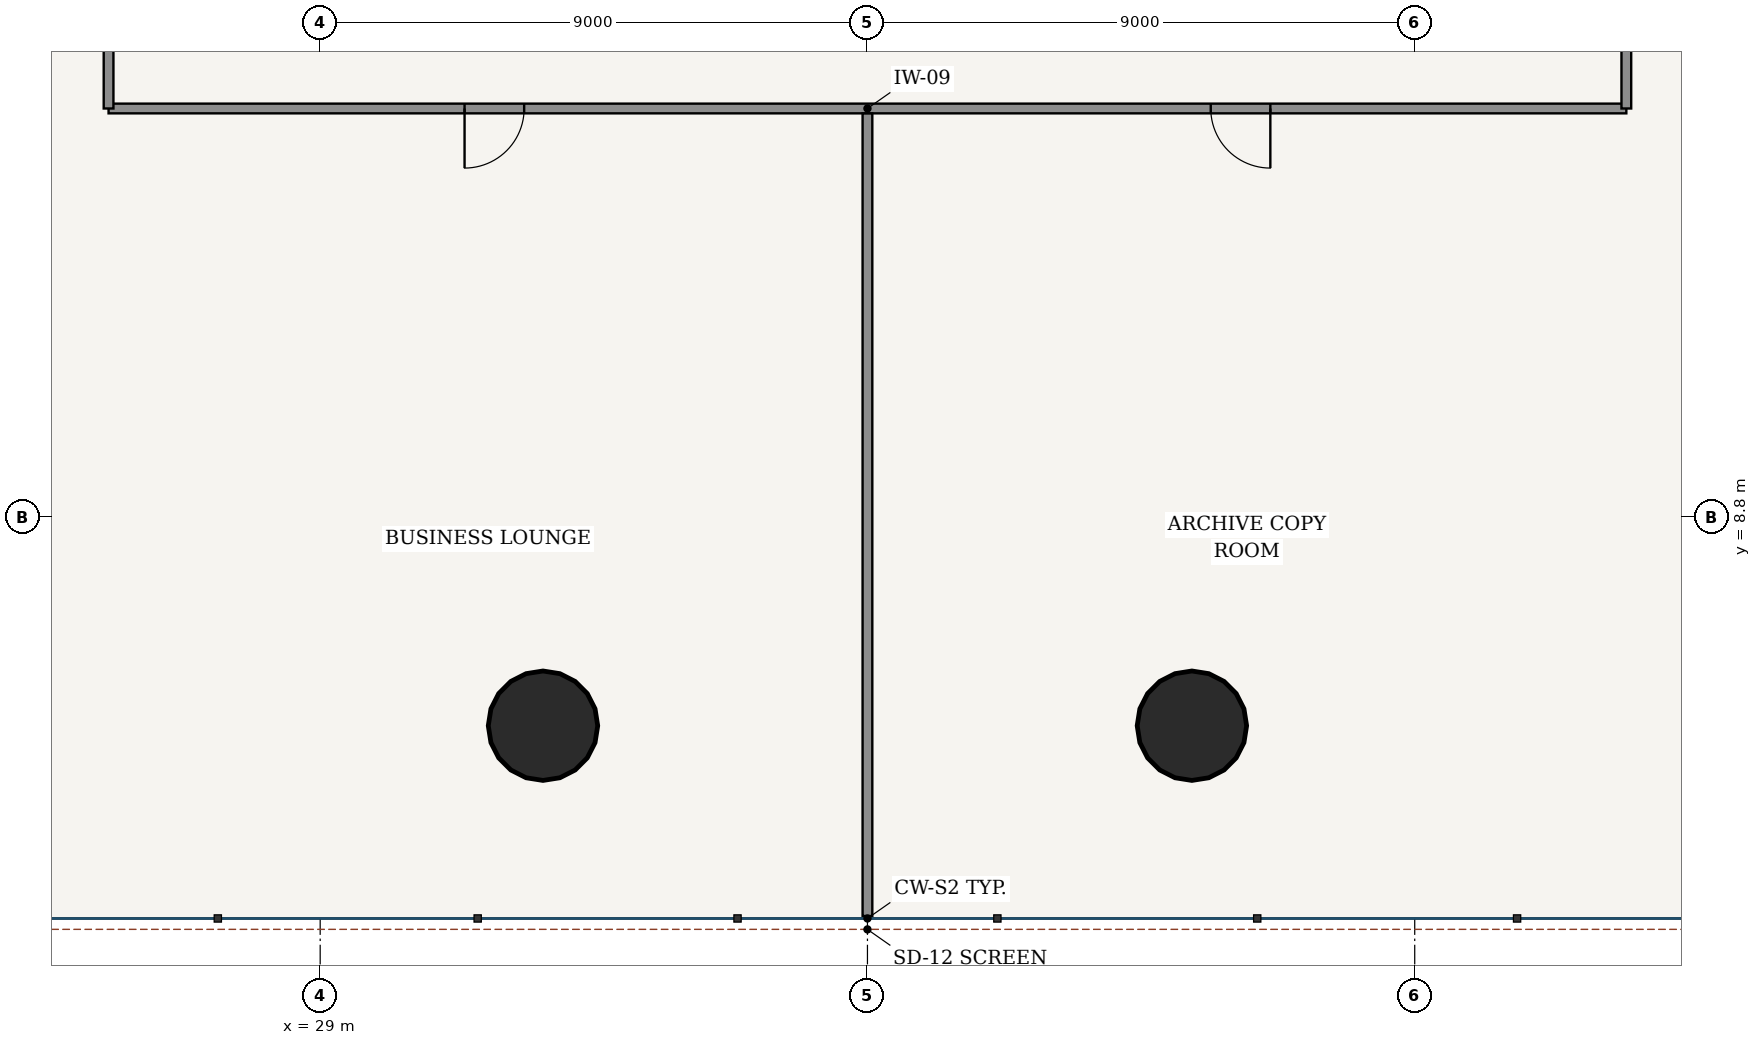
"""IFC4 building model, lengths in metres.
Left out: names, types, materials, properties, quantities, classifications, styles, units other than length and angle.
Written with IfcOpenShell. Run it as: python <this file> out.ifc"""

import sys

from ifc_helpers import new_model, si_unit, direction, frame, frame_2d, origin, origin_2d, place, context, subcontext, project, spatial, rectangle, hollow_circle, extrude, source, transform, mapped, element, fill, save


model = new_model("IFC4")
c1 = context("Model", 3, precision=1e-05, world=origin(), true_north=direction((-0.2419218956, 0.970295726276)))
c2 = subcontext(c1, "Body", "Model", "MODEL_VIEW")
j1 = project(units=[si_unit("LENGTHUNIT", "METRE"), si_unit("PLANEANGLEUNIT", "RADIAN")], contexts=[c1])
p1 = place(None, origin())
s1 = spatial("IfcSite", under=j1, at=p1, CompositionType="ELEMENT")
p2 = place(p1, origin())
s2 = spatial("IfcBuilding", under=s1, at=p2, CompositionType="ELEMENT")
p3 = place(p2, frame((0.0, 0.0, 9.9)))
s3 = spatial("IfcBuildingStorey", under=s2, at=p3, CompositionType="ELEMENT", Elevation=9.9)
for number, where, z_axis, x_axis in (
    (1, (32.664, 5.37, 0.0), (0.0, 0.0, 1.0), (1.0, 0.0, 0.0)),
    (2, (43.336, 5.37, 0.0), (0.0, 0.0, 1.0), (1.0, 0.0, 0.0)),
):
    element("IfcColumn", number, at=place(p3, frame(where, z_axis=z_axis, x_axis=x_axis)), inside=s3, PredefinedType="COLUMN", context=c2, shape_type="SweptSolid", body=[
        extrude(hollow_circle(Radius=0.9, WallThickness=0.055, at=origin_2d()), origin(), (0.0, 0.0, 1.0), 4.5),
    ])
p4 = place(p3, frame((25.52, 15.52, 0.0), z_axis=(0.0, 0.0, 1.0), x_axis=(1.0, 0.0, 0.0)))
e3 = element("IfcWall", 3, at=p4, inside=s3, PredefinedType="PARTITIONING", context=c2, shape_type="SweptSolid", body=[
    extrude(rectangle(XDim=24.96, YDim=0.16, at=frame_2d((12.48, 0.0))), origin(), (0.0, 0.0, 1.0), 3.55),
])
p5 = place(p4, frame((5.854, 0.0, 0.0)))
e4 = element("IfcOpeningElement", 4, at=p5, cuts=e3, PredefinedType="OPENING", context=c2, shape_type="SweptSolid", body=[
    extrude(rectangle(XDim=0.98, YDim=2.2, at=frame_2d((0.49, 1.1))), frame((0.0, 0.09, 0.0), z_axis=(0.0, -1.0, 0.0), x_axis=(1.0, 0.0, 0.0)), (0.0, 0.0, 1.0), 0.18),
])
p6 = place(p4, frame((18.125, 0.0, 0.0)))
e5 = element("IfcOpeningElement", 5, at=p6, cuts=e3, PredefinedType="OPENING", context=c2, shape_type="SweptSolid", body=[
    extrude(rectangle(XDim=0.98, YDim=2.2, at=frame_2d((0.49, 1.1))), frame((0.0, 0.09, 0.0), z_axis=(0.0, -1.0, 0.0), x_axis=(1.0, 0.0, 0.0)), (0.0, 0.0, 1.0), 0.18),
])
p7 = place(p3, frame((25.52, 15.52, 0.0), z_axis=(0.0, 0.0, 1.0), x_axis=(0.0, 1.0, 0.0)))
e6 = element("IfcWall", 6, at=p7, inside=s3, PredefinedType="PARTITIONING", context=c2, shape_type="SweptSolid", body=[
    extrude(rectangle(XDim=21.56, YDim=0.16, at=frame_2d((10.78, 0.0))), origin(), (0.0, 0.0, 1.0), 3.55),
])
p8 = place(p7, frame((5.254, 0.0, 0.0)))
e7 = element("IfcOpeningElement", 7, at=p8, cuts=e6, PredefinedType="OPENING", context=c2, shape_type="SweptSolid", body=[
    extrude(rectangle(XDim=0.98, YDim=2.2, at=frame_2d((0.49, 1.1))), frame((0.0, 0.09, 0.0), z_axis=(0.0, -1.0, 0.0), x_axis=(1.0, 0.0, 0.0)), (0.0, 0.0, 1.0), 0.18),
])
p9 = place(p3, frame((50.48, 15.52, 0.0), z_axis=(0.0, 0.0, 1.0), x_axis=(0.0, 1.0, 0.0)))
e8 = element("IfcWall", 8, at=p9, inside=s3, PredefinedType="PARTITIONING", context=c2, shape_type="SweptSolid", body=[
    extrude(rectangle(XDim=21.56, YDim=0.16, at=frame_2d((10.78, 0.0))), origin(), (0.0, 0.0, 1.0), 3.55),
])
p10 = place(p9, frame((5.254, 0.0, 0.0)))
e9 = element("IfcOpeningElement", 9, at=p10, cuts=e8, PredefinedType="OPENING", context=c2, shape_type="SweptSolid", body=[
    extrude(rectangle(XDim=0.98, YDim=2.2, at=frame_2d((0.49, 1.1))), frame((0.0, 0.09, 0.0), z_axis=(0.0, -1.0, 0.0), x_axis=(1.0, 0.0, 0.0)), (0.0, 0.0, 1.0), 0.18),
])
p11 = place(p3, frame((38.0, 2.24, 0.0), z_axis=(0.0, 0.0, 1.0), x_axis=(0.0, 1.0, 0.0)))
e10 = element("IfcWall", 10, at=p11, inside=s3, PredefinedType="PARTITIONING", context=c2, shape_type="SweptSolid", body=[
    extrude(rectangle(XDim=13.198, YDim=0.16, at=frame_2d((6.599, 0.0))), origin(), (0.0, 0.0, 1.0), 3.642),
])
m1 = source(origin(), c2, "Body", "SweptSolid", [
    extrude(rectangle(XDim=0.98, YDim=2.2, at=frame_2d((0.49, 1.1))), frame((0.0, 0.025, 0.0), z_axis=(0.0, -1.0, 0.0), x_axis=(1.0, 0.0, 0.0)), (0.0, 0.0, 1.0), 0.05),
])
p12 = place(p5, frame((0.98, 0.0, 0.0), z_axis=(0.0, 0.0, 1.0), x_axis=(-1.0, 0.0, 0.0)))
e11 = element("IfcDoor", 11, at=p12, inside=s3, OperationType="SINGLE_SWING_RIGHT", PredefinedType="DOOR", context=c2, shape_type="MappedRepresentation", body=[
    mapped(m1, transform((0.0, 0.0, 0.0), scale=1.0)),
])
fill(e4, e11)
p13 = place(p6, frame((0.98, 0.0, 0.0), z_axis=(0.0, 0.0, 1.0), x_axis=(-1.0, 0.0, 0.0)))
e12 = element("IfcDoor", 12, at=p13, inside=s3, OperationType="SINGLE_SWING_LEFT", PredefinedType="DOOR", context=c2, shape_type="MappedRepresentation", body=[
    mapped(m1, transform((0.0, 0.0, 0.0), scale=1.0)),
])
fill(e5, e12)
save(model, sys.argv[1])
